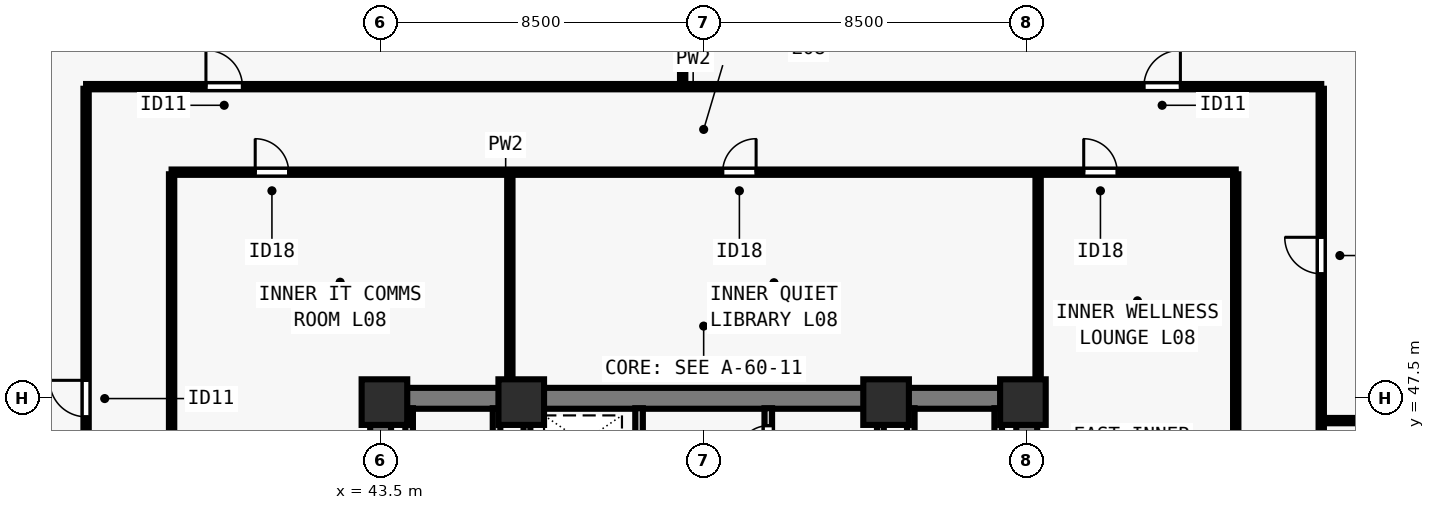
"""IFC4 building model, lengths in metres.
Left out: names, types, materials, properties, quantities, classifications, styles, units other than length and angle.
Written with IfcOpenShell. Run it as: python <this file> out.ifc"""

import sys

from ifc_helpers import new_model, si_unit, direction, frame, frame_2d, origin, origin_2d, place, context, subcontext, project, spatial, rectangle, extrude, element, fill, save


model = new_model("IFC4")
c1 = context("Model", 3, precision=1e-05, world=origin(), true_north=direction((0.0, 1.0)))
c2 = subcontext(c1, "Body", "Model", "MODEL_VIEW")
j1 = project(units=[si_unit("LENGTHUNIT", "METRE"), si_unit("PLANEANGLEUNIT", "RADIAN")], contexts=[c1])
p1 = place(None, origin())
s1 = spatial("IfcSite", under=j1, at=p1, CompositionType="ELEMENT")
p2 = place(p1, origin())
s2 = spatial("IfcBuilding", under=s1, at=p2, CompositionType="ELEMENT")
p3 = place(p2, frame((0.0, 0.0, 34.0)))
s3 = spatial("IfcBuildingStorey", under=s2, at=p3, CompositionType="ELEMENT", Elevation=34.0)
for number, where, z_axis, x_axis in (
    (1, (43.6, 47.4, 0.0), (0.0, 0.0, 1.0), (1.0, 0.0, 0.0)),
    (2, (47.2, 47.4, 0.0), (0.0, 0.0, 1.0), (1.0, 0.0, 0.0)),
    (3, (56.8, 47.4, 0.0), (0.0, 0.0, 1.0), (1.0, 0.0, 0.0)),
    (4, (60.4, 47.4, 0.0), (0.0, 0.0, 1.0), (1.0, 0.0, 0.0)),
):
    element("IfcColumn", number, at=place(p3, frame(where, z_axis=z_axis, x_axis=x_axis)), inside=s3, PredefinedType="COLUMN", context=c2, shape_type="SweptSolid", body=[
        extrude(rectangle(XDim=1.2, YDim=1.2, at=origin_2d()), origin(), (0.0, 0.0, 1.0), 3.5),
    ])
p4 = place(p3, frame((43.225, 47.5, 0.0), z_axis=(0.0, 0.0, 1.0), x_axis=(1.0, 0.0, 0.0)))
e5 = element("IfcWall", 5, at=p4, inside=s3, PredefinedType="SHEAR", context=c2, shape_type="SweptSolid", body=[
    extrude(rectangle(XDim=17.55, YDim=0.55, at=frame_2d((8.775, 0.0))), origin(), (0.0, 0.0, 1.0), 3.28),
])
for number, where, z_axis, x_axis in (
    (6, (43.5, 40.8, 0.0), (0.0, 0.0, 1.0), (0.0, 1.0, 0.0)),
    (7, (60.5, 40.8, 0.0), (0.0, 0.0, 1.0), (0.0, 1.0, 0.0)),
):
    element("IfcWall", number, at=place(p3, frame(where, z_axis=z_axis, x_axis=x_axis)), inside=s3, PredefinedType="SHEAR", context=c2, shape_type="SweptSolid", body=[
        extrude(rectangle(XDim=6.435, YDim=0.55, at=frame_2d((3.218, 0.0))), origin(), (0.0, 0.0, 1.0), 3.28),
    ])
p5 = place(p3, frame((50.3, 40.585, 0.0), z_axis=(0.0, 0.0, 1.0), x_axis=(0.0, 1.0, 0.0)))
e8 = element("IfcWall", 8, at=p5, inside=s3, PredefinedType="SOLIDWALL", context=c2, shape_type="SweptSolid", body=[
    extrude(rectangle(XDim=6.655, YDim=0.2, at=frame_2d((3.328, 0.0))), origin(), (0.0, 0.0, 1.0), 3.28),
])
p6 = place(p5, frame((5.065, 0.0, 0.0)))
e9 = element("IfcOpeningElement", 9, at=p6, cuts=e8, PredefinedType="OPENING", context=c2, shape_type="SweptSolid", body=[
    extrude(rectangle(XDim=0.8, YDim=2.08, at=frame_2d((0.4, 1.04))), frame((0.0, 0.11, 0.0), z_axis=(0.0, -1.0, 0.0), x_axis=(1.0, 0.0, 0.0)), (0.0, 0.0, 1.0), 0.22),
])
p7 = place(p3, frame((53.7, 40.585, 0.0), z_axis=(0.0, 0.0, 1.0), x_axis=(0.0, 1.0, 0.0)))
e10 = element("IfcWall", 10, at=p7, inside=s3, PredefinedType="SOLIDWALL", context=c2, shape_type="SweptSolid", body=[
    extrude(rectangle(XDim=6.655, YDim=0.2, at=frame_2d((3.328, 0.0))), origin(), (0.0, 0.0, 1.0), 3.28),
])
p8 = place(p7, frame((0.195, 0.0, 0.0)))
e11 = element("IfcOpeningElement", 11, at=p8, cuts=e10, PredefinedType="OPENING", context=c2, shape_type="SweptSolid", body=[
    extrude(rectangle(XDim=0.8, YDim=2.08, at=frame_2d((0.4, 1.04))), frame((0.0, 0.11, 0.0), z_axis=(0.0, -1.0, 0.0), x_axis=(1.0, 0.0, 0.0)), (0.0, 0.0, 1.0), 0.22),
])
p9 = place(p7, frame((3.735, 0.0, 0.0)))
e12 = element("IfcOpeningElement", 12, at=p9, cuts=e10, PredefinedType="OPENING", context=c2, shape_type="SweptSolid", body=[
    extrude(rectangle(XDim=0.9, YDim=2.12, at=frame_2d((0.45, 1.06))), frame((0.0, 0.11, 0.0), z_axis=(0.0, -1.0, 0.0), x_axis=(1.0, 0.0, 0.0)), (0.0, 0.0, 1.0), 0.22),
])
p10 = place(p7, frame((5.395, 0.0, 0.0)))
e13 = element("IfcOpeningElement", 13, at=p10, cuts=e10, PredefinedType="OPENING", context=c2, shape_type="SweptSolid", body=[
    extrude(rectangle(XDim=0.8, YDim=2.1, at=frame_2d((0.4, 1.05))), frame((0.0, 0.11, 0.0), z_axis=(0.0, -1.0, 0.0), x_axis=(1.0, 0.0, 0.0)), (0.0, 0.0, 1.0), 0.22),
])
for number, where, z_axis, x_axis in (
    (14, (46.55, 43.735, 0.0), (0.0, 0.0, 1.0), (0.0, 1.0, 0.0)),
    (15, (44.25, 43.735, 0.0), (0.0, 0.0, 1.0), (0.0, 1.0, 0.0)),
    (16, (57.45, 43.735, 0.0), (0.0, 0.0, 1.0), (0.0, 1.0, 0.0)),
    (17, (59.75, 43.735, 0.0), (0.0, 0.0, 1.0), (0.0, 1.0, 0.0)),
):
    element("IfcWall", number, at=place(p3, frame(where, z_axis=z_axis, x_axis=x_axis)), inside=s3, PredefinedType="SOLIDWALL", context=c2, shape_type="SweptSolid", body=[
        extrude(rectangle(XDim=3.505, YDim=0.2, at=frame_2d((1.752, 0.0))), origin(), (0.0, 0.0, 1.0), 3.28),
    ])
for number, where, z_axis, x_axis in (
    (18, (47.35, 43.735, 0.0), (0.0, 0.0, 1.0), (0.0, 1.0, 0.0)),
    (19, (56.65, 43.735, 0.0), (0.0, 0.0, 1.0), (0.0, 1.0, 0.0)),
):
    element("IfcWall", number, at=place(p3, frame(where, z_axis=z_axis, x_axis=x_axis)), inside=s3, PredefinedType="SOLIDWALL", context=c2, shape_type="SweptSolid", body=[
        extrude(rectangle(XDim=3.505, YDim=0.18, at=frame_2d((1.752, 0.0))), origin(), (0.0, 0.0, 1.0), 3.28),
    ])
p11 = place(p3, frame((35.75, 55.7, 0.0), z_axis=(0.0, 0.0, 1.0), x_axis=(1.0, 0.0, 0.0)))
e20 = element("IfcWall", 20, at=p11, inside=s3, PredefinedType="PARTITIONING", context=c2, shape_type="SweptSolid", body=[
    extrude(rectangle(XDim=32.5, YDim=0.14, at=frame_2d((16.25, 0.0))), origin(), (0.0, 0.0, 1.0), 3.28),
])
p12 = place(p11, frame((3.154, 0.0, 0.0)))
e21 = element("IfcOpeningElement", 21, at=p12, cuts=e20, PredefinedType="OPENING", context=c2, shape_type="SweptSolid", body=[
    extrude(rectangle(XDim=0.96, YDim=2.12, at=frame_2d((0.48, 1.06))), frame((0.0, 0.08, 0.0), z_axis=(0.0, -1.0, 0.0), x_axis=(1.0, 0.0, 0.0)), (0.0, 0.0, 1.0), 0.16),
])
p13 = place(p11, frame((27.834, 0.0, 0.0)))
e22 = element("IfcOpeningElement", 22, at=p13, cuts=e20, PredefinedType="OPENING", context=c2, shape_type="SweptSolid", body=[
    extrude(rectangle(XDim=0.96, YDim=2.12, at=frame_2d((0.48, 1.06))), frame((0.0, 0.08, 0.0), z_axis=(0.0, -1.0, 0.0), x_axis=(1.0, 0.0, 0.0)), (0.0, 0.0, 1.0), 0.16),
])
p14 = place(p3, frame((35.75, 22.355, 0.0), z_axis=(0.0, 0.0, 1.0), x_axis=(0.0, 1.0, 0.0)))
e23 = element("IfcWall", 23, at=p14, inside=s3, PredefinedType="PARTITIONING", context=c2, shape_type="SweptSolid", body=[
    extrude(rectangle(XDim=33.29, YDim=0.14, at=frame_2d((16.645, 0.0))), origin(), (0.0, 0.0, 1.0), 3.28),
])
p15 = place(p14, frame((8.058, 0.0, 0.0)))
e24 = element("IfcOpeningElement", 24, at=p15, cuts=e23, PredefinedType="OPENING", context=c2, shape_type="SweptSolid", body=[
    extrude(rectangle(XDim=0.96, YDim=2.12, at=frame_2d((0.48, 1.06))), frame((0.0, 0.08, 0.0), z_axis=(0.0, -1.0, 0.0), x_axis=(1.0, 0.0, 0.0)), (0.0, 0.0, 1.0), 0.16),
])
p16 = place(p14, frame((24.658, 0.0, 0.0)))
e25 = element("IfcOpeningElement", 25, at=p16, cuts=e23, PredefinedType="OPENING", context=c2, shape_type="SweptSolid", body=[
    extrude(rectangle(XDim=0.96, YDim=2.12, at=frame_2d((0.48, 1.06))), frame((0.0, 0.08, 0.0), z_axis=(0.0, -1.0, 0.0), x_axis=(1.0, 0.0, 0.0)), (0.0, 0.0, 1.0), 0.16),
])
p17 = place(p3, frame((68.25, 22.355, 0.0), z_axis=(0.0, 0.0, 1.0), x_axis=(0.0, 1.0, 0.0)))
e26 = element("IfcWall", 26, at=p17, inside=s3, PredefinedType="PARTITIONING", context=c2, shape_type="SweptSolid", body=[
    extrude(rectangle(XDim=33.29, YDim=0.14, at=frame_2d((16.645, 0.0))), origin(), (0.0, 0.0, 1.0), 3.28),
])
p18 = place(p17, frame((3.522, 0.0, 0.0)))
e27 = element("IfcOpeningElement", 27, at=p18, cuts=e26, PredefinedType="OPENING", context=c2, shape_type="SweptSolid", body=[
    extrude(rectangle(XDim=0.96, YDim=2.12, at=frame_2d((0.48, 1.06))), frame((0.0, 0.08, 0.0), z_axis=(0.0, -1.0, 0.0), x_axis=(1.0, 0.0, 0.0)), (0.0, 0.0, 1.0), 0.16),
])
p19 = place(p17, frame((11.956, 0.0, 0.0)))
e28 = element("IfcOpeningElement", 28, at=p19, cuts=e26, PredefinedType="OPENING", context=c2, shape_type="SweptSolid", body=[
    extrude(rectangle(XDim=0.96, YDim=2.12, at=frame_2d((0.48, 1.06))), frame((0.0, 0.08, 0.0), z_axis=(0.0, -1.0, 0.0), x_axis=(1.0, 0.0, 0.0)), (0.0, 0.0, 1.0), 0.16),
])
p20 = place(p17, frame((20.256, 0.0, 0.0)))
e29 = element("IfcOpeningElement", 29, at=p20, cuts=e26, PredefinedType="OPENING", context=c2, shape_type="SweptSolid", body=[
    extrude(rectangle(XDim=0.96, YDim=2.12, at=frame_2d((0.48, 1.06))), frame((0.0, 0.08, 0.0), z_axis=(0.0, -1.0, 0.0), x_axis=(1.0, 0.0, 0.0)), (0.0, 0.0, 1.0), 0.16),
])
p21 = place(p17, frame((28.422, 0.0, 0.0)))
e30 = element("IfcOpeningElement", 30, at=p21, cuts=e26, PredefinedType="OPENING", context=c2, shape_type="SweptSolid", body=[
    extrude(rectangle(XDim=0.96, YDim=2.12, at=frame_2d((0.48, 1.06))), frame((0.0, 0.08, 0.0), z_axis=(0.0, -1.0, 0.0), x_axis=(1.0, 0.0, 0.0)), (0.0, 0.0, 1.0), 0.16),
])
p22 = place(p3, frame((38.0, 53.45, 0.0), z_axis=(0.0, 0.0, 1.0), x_axis=(1.0, 0.0, 0.0)))
e31 = element("IfcWall", 31, at=p22, inside=s3, PredefinedType="PARTITIONING", context=c2, shape_type="SweptSolid", body=[
    extrude(rectangle(XDim=28.0, YDim=0.14, at=frame_2d((14.0, 0.0))), origin(), (0.0, 0.0, 1.0), 3.28),
])
p23 = place(p22, frame((2.2, 0.0, 0.0)))
e32 = element("IfcOpeningElement", 32, at=p23, cuts=e31, PredefinedType="OPENING", context=c2, shape_type="SweptSolid", body=[
    extrude(rectangle(XDim=0.88, YDim=2.1, at=frame_2d((0.44, 1.05))), frame((0.0, 0.08, 0.0), z_axis=(0.0, -1.0, 0.0), x_axis=(1.0, 0.0, 0.0)), (0.0, 0.0, 1.0), 0.16),
])
p24 = place(p22, frame((14.5, 0.0, 0.0)))
e33 = element("IfcOpeningElement", 33, at=p24, cuts=e31, PredefinedType="OPENING", context=c2, shape_type="SweptSolid", body=[
    extrude(rectangle(XDim=0.88, YDim=2.1, at=frame_2d((0.44, 1.05))), frame((0.0, 0.08, 0.0), z_axis=(0.0, -1.0, 0.0), x_axis=(1.0, 0.0, 0.0)), (0.0, 0.0, 1.0), 0.16),
])
p25 = place(p22, frame((24.0, 0.0, 0.0)))
e34 = element("IfcOpeningElement", 34, at=p25, cuts=e31, PredefinedType="OPENING", context=c2, shape_type="SweptSolid", body=[
    extrude(rectangle(XDim=0.88, YDim=2.1, at=frame_2d((0.44, 1.05))), frame((0.0, 0.08, 0.0), z_axis=(0.0, -1.0, 0.0), x_axis=(1.0, 0.0, 0.0)), (0.0, 0.0, 1.0), 0.16),
])
p26 = place(p3, frame((38.0, 40.8, 0.0), z_axis=(0.0, 0.0, 1.0), x_axis=(0.0, 1.0, 0.0)))
e35 = element("IfcWall", 35, at=p26, inside=s3, PredefinedType="PARTITIONING", context=c2, shape_type="SweptSolid", body=[
    extrude(rectangle(XDim=12.595, YDim=0.14, at=frame_2d((6.297, 0.0))), origin(), (0.0, 0.0, 1.0), 3.28),
])
p27 = place(p26, frame((2.5, 0.0, 0.0)))
e36 = element("IfcOpeningElement", 36, at=p27, cuts=e35, PredefinedType="OPENING", context=c2, shape_type="SweptSolid", body=[
    extrude(rectangle(XDim=0.88, YDim=2.1, at=frame_2d((0.44, 1.05))), frame((0.0, 0.08, 0.0), z_axis=(0.0, -1.0, 0.0), x_axis=(1.0, 0.0, 0.0)), (0.0, 0.0, 1.0), 0.16),
])
p28 = place(p3, frame((66.0, 40.8, 0.0), z_axis=(0.0, 0.0, 1.0), x_axis=(0.0, 1.0, 0.0)))
e37 = element("IfcWall", 37, at=p28, inside=s3, PredefinedType="PARTITIONING", context=c2, shape_type="SweptSolid", body=[
    extrude(rectangle(XDim=12.595, YDim=0.14, at=frame_2d((6.297, 0.0))), origin(), (0.0, 0.0, 1.0), 3.28),
])
p29 = place(p28, frame((2.5, 0.0, 0.0)))
e38 = element("IfcOpeningElement", 38, at=p29, cuts=e37, PredefinedType="OPENING", context=c2, shape_type="SweptSolid", body=[
    extrude(rectangle(XDim=0.88, YDim=2.1, at=frame_2d((0.44, 1.05))), frame((0.0, 0.08, 0.0), z_axis=(0.0, -1.0, 0.0), x_axis=(1.0, 0.0, 0.0)), (0.0, 0.0, 1.0), 0.16),
])
p30 = place(p3, frame((46.9, 47.76, 0.0), z_axis=(0.0, 0.0, 1.0), x_axis=(0.0, 1.0, 0.0)))
e39 = element("IfcWall", 39, at=p30, inside=s3, PredefinedType="PARTITIONING", context=c2, shape_type="SweptSolid", body=[
    extrude(rectangle(XDim=5.635, YDim=0.14, at=frame_2d((2.817, 0.0))), origin(), (0.0, 0.0, 1.0), 3.28),
])
p31 = place(p3, frame((60.8, 47.76, 0.0), z_axis=(0.0, 0.0, 1.0), x_axis=(0.0, 1.0, 0.0)))
e40 = element("IfcWall", 40, at=p31, inside=s3, PredefinedType="PARTITIONING", context=c2, shape_type="SweptSolid", body=[
    extrude(rectangle(XDim=5.635, YDim=0.14, at=frame_2d((2.817, 0.0))), origin(), (0.0, 0.0, 1.0), 2.439),
])
p32 = place(p3, frame((51.448, 55.8, 0.0), z_axis=(0.0, 0.0, 1.0), x_axis=(0.0, 1.0, 0.0)))
e41 = element("IfcWall", 41, at=p32, inside=s3, PredefinedType="PARTITIONING", context=c2, shape_type="SweptSolid", body=[
    extrude(rectangle(XDim=8.28, YDim=0.14, at=frame_2d((4.14, 0.0))), origin(), (0.0, 0.0, 1.0), 3.28),
])
p33 = place(p3, frame((68.35, 46.913, 0.0), z_axis=(0.0, 0.0, 1.0), x_axis=(1.0, 0.0, 0.0)))
e42 = element("IfcWall", 42, at=p33, inside=s3, PredefinedType="PARTITIONING", context=c2, shape_type="SweptSolid", body=[
    extrude(rectangle(XDim=8.73, YDim=0.14, at=frame_2d((4.365, 0.0))), origin(), (0.0, 0.0, 1.0), 3.28),
])
p34 = place(p10, origin())
e43 = element("IfcDoor", 43, at=p34, inside=s3, OperationType="SINGLE_SWING_LEFT", PredefinedType="DOOR", context=c2, shape_type="SweptSolid", body=[
    extrude(rectangle(XDim=0.8, YDim=2.1, at=frame_2d((0.4, 1.05))), frame((0.0, 0.025, 0.0), z_axis=(0.0, -1.0, 0.0), x_axis=(1.0, 0.0, 0.0)), (0.0, 0.0, 1.0), 0.05),
])
fill(e13, e43)
p35 = place(p23, origin())
e44 = element("IfcDoor", 44, at=p35, inside=s3, OperationType="SINGLE_SWING_LEFT", PredefinedType="DOOR", context=c2, shape_type="SweptSolid", body=[
    extrude(rectangle(XDim=0.88, YDim=2.1, at=frame_2d((0.44, 1.05))), frame((0.0, 0.025, 0.0), z_axis=(0.0, -1.0, 0.0), x_axis=(1.0, 0.0, 0.0)), (0.0, 0.0, 1.0), 0.05),
])
fill(e32, e44)
p36 = place(p24, origin())
e45 = element("IfcDoor", 45, at=p36, inside=s3, OperationType="SINGLE_SWING_RIGHT", PredefinedType="DOOR", context=c2, shape_type="SweptSolid", body=[
    extrude(rectangle(XDim=0.88, YDim=2.1, at=frame_2d((0.44, 1.05))), frame((0.0, 0.025, 0.0), z_axis=(0.0, -1.0, 0.0), x_axis=(1.0, 0.0, 0.0)), (0.0, 0.0, 1.0), 0.05),
])
fill(e33, e45)
p37 = place(p25, origin())
e46 = element("IfcDoor", 46, at=p37, inside=s3, OperationType="SINGLE_SWING_LEFT", PredefinedType="DOOR", context=c2, shape_type="SweptSolid", body=[
    extrude(rectangle(XDim=0.88, YDim=2.1, at=frame_2d((0.44, 1.05))), frame((0.0, 0.025, 0.0), z_axis=(0.0, -1.0, 0.0), x_axis=(1.0, 0.0, 0.0)), (0.0, 0.0, 1.0), 0.05),
])
fill(e34, e46)
p38 = place(p12, origin())
e47 = element("IfcDoor", 47, at=p38, inside=s3, OperationType="SINGLE_SWING_LEFT", PredefinedType="DOOR", context=c2, shape_type="SweptSolid", body=[
    extrude(rectangle(XDim=0.96, YDim=2.12, at=frame_2d((0.48, 1.06))), frame((0.0, 0.025, 0.0), z_axis=(0.0, -1.0, 0.0), x_axis=(1.0, 0.0, 0.0)), (0.0, 0.0, 1.0), 0.05),
])
fill(e21, e47)
p39 = place(p13, origin())
e48 = element("IfcDoor", 48, at=p39, inside=s3, OperationType="SINGLE_SWING_RIGHT", PredefinedType="DOOR", context=c2, shape_type="SweptSolid", body=[
    extrude(rectangle(XDim=0.96, YDim=2.12, at=frame_2d((0.48, 1.06))), frame((0.0, 0.025, 0.0), z_axis=(0.0, -1.0, 0.0), x_axis=(1.0, 0.0, 0.0)), (0.0, 0.0, 1.0), 0.05),
])
fill(e22, e48)
p40 = place(p16, origin())
e49 = element("IfcDoor", 49, at=p40, inside=s3, OperationType="SINGLE_SWING_RIGHT", PredefinedType="DOOR", context=c2, shape_type="SweptSolid", body=[
    extrude(rectangle(XDim=0.96, YDim=2.12, at=frame_2d((0.48, 1.06))), frame((0.0, 0.025, 0.0), z_axis=(0.0, -1.0, 0.0), x_axis=(1.0, 0.0, 0.0)), (0.0, 0.0, 1.0), 0.05),
])
fill(e25, e49)
p41 = place(p21, origin())
e50 = element("IfcDoor", 50, at=p41, inside=s3, OperationType="SINGLE_SWING_RIGHT", PredefinedType="DOOR", context=c2, shape_type="SweptSolid", body=[
    extrude(rectangle(XDim=0.96, YDim=2.12, at=frame_2d((0.48, 1.06))), frame((0.0, 0.025, 0.0), z_axis=(0.0, -1.0, 0.0), x_axis=(1.0, 0.0, 0.0)), (0.0, 0.0, 1.0), 0.05),
])
fill(e30, e50)
save(model, sys.argv[1])
